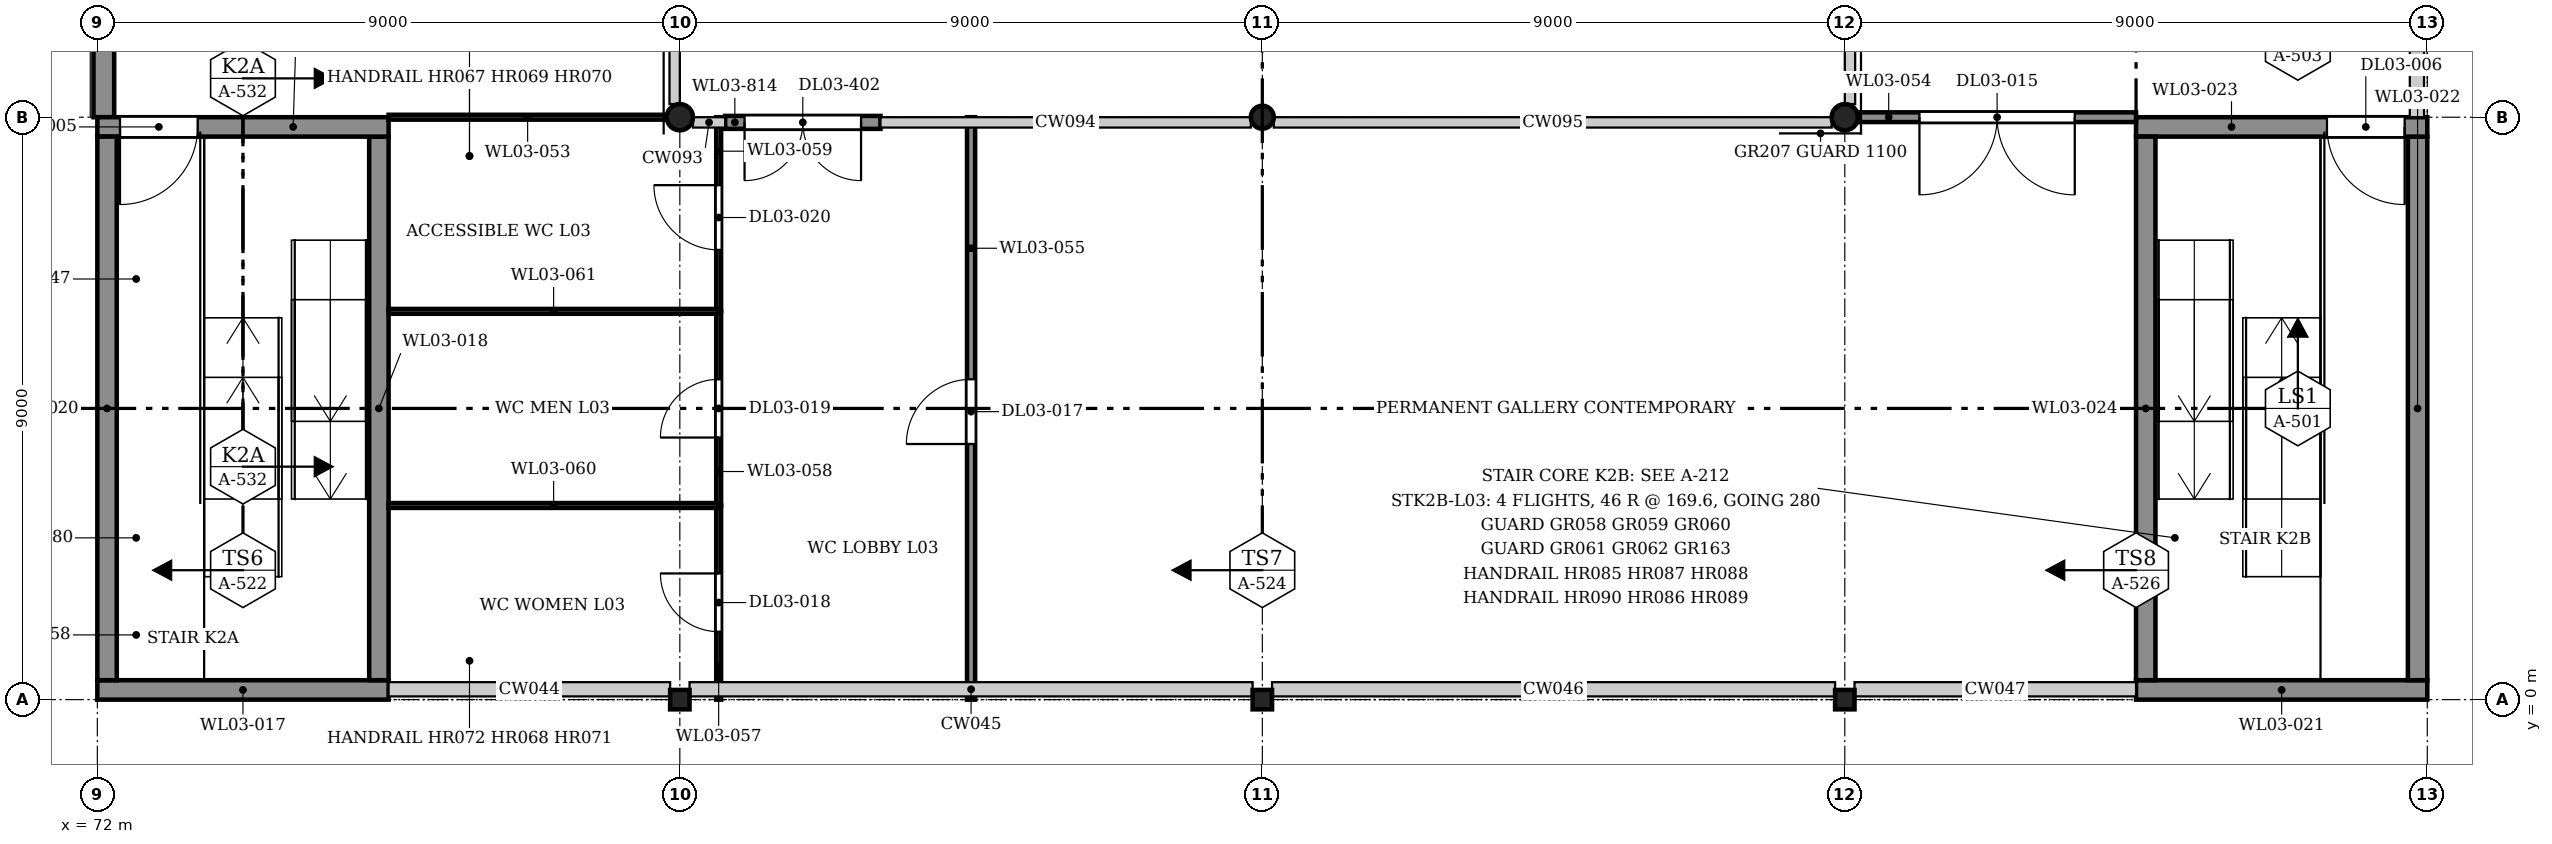
"""IFC4 building model, lengths in metres.
Left out: names, types, materials, properties, quantities, classifications, styles, units other than length and angle.
Written with IfcOpenShell. Run it as: python <this file> out.ifc"""

import sys

from ifc_helpers import new_model, si_unit, direction, frame, frame_2d, origin, origin_2d, place, context, subcontext, project, spatial, rectangle, hollow_rectangle, hollow_circle, extrude, element, fill, save


model = new_model("IFC4")
c1 = context("Model", 3, precision=1e-05, world=origin(), true_north=direction((0.0, 1.0)))
c2 = subcontext(c1, "Body", "Model", "MODEL_VIEW")
j1 = project(units=[si_unit("LENGTHUNIT", "METRE"), si_unit("PLANEANGLEUNIT", "RADIAN")], contexts=[c1])
p1 = place(None, origin())
s1 = spatial("IfcSite", under=j1, at=p1, CompositionType="ELEMENT")
p2 = place(p1, origin())
s2 = spatial("IfcBuilding", under=s1, at=p2, CompositionType="ELEMENT")
p3 = place(p2, frame((0.0, 0.0, 13.4)))
s3 = spatial("IfcBuildingStorey", under=s2, at=p3, CompositionType="ELEMENT", Elevation=13.4)
p4 = place(p3, frame((81.0, 0.0, 0.0), z_axis=(0.0, 0.0, 1.0), x_axis=(1.0, 0.0, 0.0)))
e1 = element("IfcColumn", 1, at=p4, inside=s3, PredefinedType="COLUMN", context=c2, shape_type="SweptSolid", body=[
    extrude(hollow_rectangle(XDim=0.3, YDim=0.3, WallThickness=0.016, InnerFilletRadius=0.024, OuterFilletRadius=0.04, at=origin_2d()), origin(), (0.0, 0.0, 1.0), 7.8),
])
p5 = place(p3, frame((90.0, 0.0, 0.0), z_axis=(0.0, 0.0, 1.0), x_axis=(1.0, 0.0, 0.0)))
e2 = element("IfcColumn", 2, at=p5, inside=s3, PredefinedType="COLUMN", context=c2, shape_type="SweptSolid", body=[
    extrude(hollow_rectangle(XDim=0.3, YDim=0.3, WallThickness=0.01, InnerFilletRadius=0.015, OuterFilletRadius=0.025, at=origin_2d()), origin(), (0.0, 0.0, 1.0), 7.8),
])
p6 = place(p3, frame((99.0, 0.0, 0.0), z_axis=(0.0, 0.0, 1.0), x_axis=(1.0, 0.0, 0.0)))
e3 = element("IfcColumn", 3, at=p6, inside=s3, PredefinedType="COLUMN", context=c2, shape_type="SweptSolid", body=[
    extrude(hollow_rectangle(XDim=0.3, YDim=0.3, WallThickness=0.016, InnerFilletRadius=0.024, OuterFilletRadius=0.04, at=origin_2d()), origin(), (0.0, 0.0, 1.0), 7.8),
])
p7 = place(p3, frame((81.0, 9.0, 0.0), z_axis=(0.0, 0.0, 1.0), x_axis=(1.0, 0.0, 0.0)))
e4 = element("IfcColumn", 4, at=p7, inside=s3, PredefinedType="COLUMN", context=c2, shape_type="SweptSolid", body=[
    extrude(hollow_circle(Radius=0.203, WallThickness=0.013, at=origin_2d()), origin(), (0.0, 0.0, 1.0), 7.8),
])
p8 = place(p3, frame((90.0, 9.0, 0.0), z_axis=(0.0, 0.0, 1.0), x_axis=(1.0, 0.0, 0.0)))
e5 = element("IfcColumn", 5, at=p8, inside=s3, PredefinedType="COLUMN", context=c2, shape_type="SweptSolid", body=[
    extrude(hollow_circle(Radius=0.178, WallThickness=0.013, at=origin_2d()), origin(), (0.0, 0.0, 1.0), 7.8),
])
p9 = place(p3, frame((99.0, 9.0, 0.0), z_axis=(0.0, 0.0, 1.0), x_axis=(1.0, 0.0, 0.0)))
e6 = element("IfcColumn", 6, at=p9, inside=s3, PredefinedType="COLUMN", context=c2, shape_type="SweptSolid", body=[
    extrude(hollow_circle(Radius=0.203, WallThickness=0.013, at=origin_2d()), origin(), (0.0, 0.0, 1.0), 7.8),
])
p10 = place(p3, frame((72.1, 9.0, 0.0), z_axis=(0.0, 0.0, 1.0), x_axis=(0.0, 1.0, 0.0)))
e7 = element("IfcWall", 7, at=p10, inside=s3, PredefinedType="SOLIDWALL", context=c2, shape_type="SweptSolid", body=[
    extrude(rectangle(XDim=9.0, YDim=0.32, at=frame_2d((4.5, 0.0))), origin(), (0.0, 0.0, 1.0), 7.635),
])
p11 = place(p3, frame((81.7, 8.92, 0.0), z_axis=(0.0, 0.0, 1.0), x_axis=(1.0, 0.0, 0.0)))
e8 = element("IfcWall", 8, at=p11, inside=s3, PredefinedType="SOLIDWALL", context=c2, shape_type="SweptSolid", body=[
    extrude(rectangle(XDim=2.4, YDim=0.2, at=frame_2d((1.2, 0.0))), origin(), (0.0, 0.0, 1.0), 6.732),
])
p12 = place(p11, frame((0.3, 0.0, 0.0)))
e9 = element("IfcOpeningElement", 9, at=p12, cuts=e8, PredefinedType="OPENING", context=c2, shape_type="SweptSolid", body=[
    extrude(rectangle(XDim=1.8, YDim=2.4, at=frame_2d((0.9, 1.2))), frame((0.0, 0.11, 0.0), z_axis=(0.0, -1.0, 0.0), x_axis=(1.0, 0.0, 0.0)), (0.0, 0.0, 1.0), 0.22),
])
p13 = place(p3, frame((72.0, 0.15, 0.0), z_axis=(0.0, 0.0, 1.0), x_axis=(1.0, 0.0, 0.0)))
e10 = element("IfcWall", 10, at=p13, inside=s3, PredefinedType="SOLIDWALL", context=c2, shape_type="SweptSolid", body=[
    extrude(rectangle(XDim=4.5, YDim=0.3, at=frame_2d((2.25, 0.0))), origin(), (0.0, 0.0, 1.0), 7.8),
])
p14 = place(p3, frame((76.35, 0.3, 0.0), z_axis=(0.0, 0.0, 1.0), x_axis=(0.0, 1.0, 0.0)))
e11 = element("IfcWall", 11, at=p14, inside=s3, PredefinedType="SOLIDWALL", context=c2, shape_type="SweptSolid", body=[
    extrude(rectangle(XDim=8.4, YDim=0.3, at=frame_2d((4.2, 0.0))), origin(), (0.0, 0.0, 1.0), 7.8),
])
p15 = place(p3, frame((72.0, 8.85, 0.0), z_axis=(0.0, 0.0, 1.0), x_axis=(1.0, 0.0, 0.0)))
e12 = element("IfcWall", 12, at=p15, inside=s3, PredefinedType="SOLIDWALL", context=c2, shape_type="SweptSolid", body=[
    extrude(rectangle(XDim=4.5, YDim=0.3, at=frame_2d((2.25, 0.0))), origin(), (0.0, 0.0, 1.0), 7.8),
])
p16 = place(p15, frame((0.35, 0.0, 0.0)))
e13 = element("IfcOpeningElement", 13, at=p16, cuts=e12, PredefinedType="OPENING", context=c2, shape_type="SweptSolid", body=[
    extrude(rectangle(XDim=1.2, YDim=2.1, at=frame_2d((0.6, 1.05))), frame((0.0, 0.16, 0.0), z_axis=(0.0, -1.0, 0.0), x_axis=(1.0, 0.0, 0.0)), (0.0, 0.0, 1.0), 0.32),
])
p17 = place(p3, frame((72.15, 0.3, 0.0), z_axis=(0.0, 0.0, 1.0), x_axis=(0.0, 1.0, 0.0)))
e14 = element("IfcWall", 14, at=p17, inside=s3, PredefinedType="SOLIDWALL", context=c2, shape_type="SweptSolid", body=[
    extrude(rectangle(XDim=8.4, YDim=0.3, at=frame_2d((4.2, 0.0))), origin(), (0.0, 0.0, 1.0), 7.8),
])
p18 = place(p3, frame((103.5, 0.15, 0.0), z_axis=(0.0, 0.0, 1.0), x_axis=(1.0, 0.0, 0.0)))
e15 = element("IfcWall", 15, at=p18, inside=s3, PredefinedType="SOLIDWALL", context=c2, shape_type="SweptSolid", body=[
    extrude(rectangle(XDim=4.5, YDim=0.3, at=frame_2d((2.25, 0.0))), origin(), (0.0, 0.0, 1.0), 7.8),
])
p19 = place(p3, frame((107.85, 0.3, 0.0), z_axis=(0.0, 0.0, 1.0), x_axis=(0.0, 1.0, 0.0)))
e16 = element("IfcWall", 16, at=p19, inside=s3, PredefinedType="SOLIDWALL", context=c2, shape_type="SweptSolid", body=[
    extrude(rectangle(XDim=8.4, YDim=0.3, at=frame_2d((4.2, 0.0))), origin(), (0.0, 0.0, 1.0), 7.8),
])
p20 = place(p3, frame((103.5, 8.85, 0.0), z_axis=(0.0, 0.0, 1.0), x_axis=(1.0, 0.0, 0.0)))
e17 = element("IfcWall", 17, at=p20, inside=s3, PredefinedType="SOLIDWALL", context=c2, shape_type="SweptSolid", body=[
    extrude(rectangle(XDim=4.5, YDim=0.3, at=frame_2d((2.25, 0.0))), origin(), (0.0, 0.0, 1.0), 7.8),
])
p21 = place(p20, frame((2.95, 0.0, 0.0)))
e18 = element("IfcOpeningElement", 18, at=p21, cuts=e17, PredefinedType="OPENING", context=c2, shape_type="SweptSolid", body=[
    extrude(rectangle(XDim=1.2, YDim=2.1, at=frame_2d((0.6, 1.05))), frame((0.0, 0.16, 0.0), z_axis=(0.0, -1.0, 0.0), x_axis=(1.0, 0.0, 0.0)), (0.0, 0.0, 1.0), 0.32),
])
p22 = place(p3, frame((103.65, 0.3, 0.0), z_axis=(0.0, 0.0, 1.0), x_axis=(0.0, 1.0, 0.0)))
e19 = element("IfcWall", 19, at=p22, inside=s3, PredefinedType="SOLIDWALL", context=c2, shape_type="SweptSolid", body=[
    extrude(rectangle(XDim=8.4, YDim=0.3, at=frame_2d((4.2, 0.0))), origin(), (0.0, 0.0, 1.0), 7.8),
])
p23 = place(p3, frame((76.5, 9.0, 0.0), z_axis=(0.0, 0.0, 1.0), x_axis=(1.0, 0.0, 0.0)))
e20 = element("IfcWall", 20, at=p23, inside=s3, PredefinedType="PARTITIONING", context=c2, shape_type="SweptSolid", body=[
    extrude(rectangle(XDim=4.297, YDim=0.075, at=frame_2d((2.148, 0.0))), origin(), (0.0, 0.0, 1.0), 7.175),
])
p24 = place(p3, frame((99.203, 9.0, 0.0), z_axis=(0.0, 0.0, 1.0), x_axis=(1.0, 0.0, 0.0)))
e21 = element("IfcWall", 21, at=p24, inside=s3, PredefinedType="PARTITIONING", context=c2, shape_type="SweptSolid", body=[
    extrude(rectangle(XDim=4.297, YDim=0.15, at=frame_2d((2.148, 0.0))), origin(), (0.0, 0.0, 1.0), 7.175),
])
p25 = place(p24, frame((0.95, 0.0, 0.0)))
e22 = element("IfcOpeningElement", 22, at=p25, cuts=e21, PredefinedType="OPENING", context=c2, shape_type="SweptSolid", body=[
    extrude(rectangle(XDim=2.4, YDim=2.4, at=frame_2d((1.2, 1.2))), frame((0.0, 0.085, 0.0), z_axis=(0.0, -1.0, 0.0), x_axis=(1.0, 0.0, 0.0)), (0.0, 0.0, 1.0), 0.17),
])
p26 = place(p3, frame((85.5, 0.0, 0.0), z_axis=(0.0, 0.0, 1.0), x_axis=(0.0, 1.0, 0.0)))
e23 = element("IfcWall", 23, at=p26, inside=s3, PredefinedType="PARTITIONING", context=c2, shape_type="SweptSolid", body=[
    extrude(rectangle(XDim=9.0, YDim=0.125, at=frame_2d((4.5, 0.0))), origin(), (0.0, 0.0, 1.0), 7.635),
])
p27 = place(p26, frame((3.95, 0.0, 0.0)))
e24 = element("IfcOpeningElement", 24, at=p27, cuts=e23, PredefinedType="OPENING", context=c2, shape_type="SweptSolid", body=[
    extrude(rectangle(XDim=1.0, YDim=2.1, at=frame_2d((0.5, 1.05))), frame((0.0, 0.073, 0.0), z_axis=(0.0, -1.0, 0.0), x_axis=(1.0, 0.0, 0.0)), (0.0, 0.0, 1.0), 0.145),
])
p28 = place(p3, frame((81.6, 0.0, 0.0), z_axis=(0.0, 0.0, 1.0), x_axis=(0.0, 1.0, 0.0)))
e25 = element("IfcWall", 25, at=p28, inside=s3, PredefinedType="PARTITIONING", context=c2, shape_type="SweptSolid", body=[
    extrude(rectangle(XDim=3.0, YDim=0.075, at=frame_2d((1.5, 0.0))), origin(), (0.0, 0.0, 1.0), 7.635),
])
p29 = place(p28, frame((1.05, 0.0, 0.0)))
e26 = element("IfcOpeningElement", 26, at=p29, cuts=e25, PredefinedType="OPENING", context=c2, shape_type="SweptSolid", body=[
    extrude(rectangle(XDim=0.9, YDim=2.1, at=frame_2d((0.45, 1.05))), frame((0.0, 0.047, 0.0), z_axis=(0.0, -1.0, 0.0), x_axis=(1.0, 0.0, 0.0)), (0.0, 0.0, 1.0), 0.095),
])
p30 = place(p3, frame((81.6, 3.0, 0.0), z_axis=(0.0, 0.0, 1.0), x_axis=(0.0, 1.0, 0.0)))
e27 = element("IfcWall", 27, at=p30, inside=s3, PredefinedType="PARTITIONING", context=c2, shape_type="SweptSolid", body=[
    extrude(rectangle(XDim=3.0, YDim=0.075, at=frame_2d((1.5, 0.0))), origin(), (0.0, 0.0, 1.0), 7.635),
])
p31 = place(p30, frame((1.05, 0.0, 0.0)))
e28 = element("IfcOpeningElement", 28, at=p31, cuts=e27, PredefinedType="OPENING", context=c2, shape_type="SweptSolid", body=[
    extrude(rectangle(XDim=0.9, YDim=2.1, at=frame_2d((0.45, 1.05))), frame((0.0, 0.047, 0.0), z_axis=(0.0, -1.0, 0.0), x_axis=(1.0, 0.0, 0.0)), (0.0, 0.0, 1.0), 0.095),
])
p32 = place(p3, frame((81.6, 6.0, 0.0), z_axis=(0.0, 0.0, 1.0), x_axis=(0.0, 1.0, 0.0)))
e29 = element("IfcWall", 29, at=p32, inside=s3, PredefinedType="PARTITIONING", context=c2, shape_type="SweptSolid", body=[
    extrude(rectangle(XDim=3.0, YDim=0.075, at=frame_2d((1.5, 0.0))), origin(), (0.0, 0.0, 1.0), 7.635),
])
p33 = place(p32, frame((0.95, 0.0, 0.0)))
e30 = element("IfcOpeningElement", 30, at=p33, cuts=e29, PredefinedType="OPENING", context=c2, shape_type="SweptSolid", body=[
    extrude(rectangle(XDim=1.0, YDim=2.1, at=frame_2d((0.5, 1.05))), frame((0.0, 0.047, 0.0), z_axis=(0.0, -1.0, 0.0), x_axis=(1.0, 0.0, 0.0)), (0.0, 0.0, 1.0), 0.095),
])
for number, where, z_axis, x_axis in (
    (31, (76.5, 3.0, 0.0), (0.0, 0.0, 1.0), (1.0, 0.0, 0.0)),
    (32, (76.5, 6.0, 0.0), (0.0, 0.0, 1.0), (1.0, 0.0, 0.0)),
):
    element("IfcWall", number, at=place(p3, frame(where, z_axis=z_axis, x_axis=x_axis)), inside=s3, PredefinedType="PARTITIONING", context=c2, shape_type="SweptSolid", body=[
        extrude(rectangle(XDim=5.1, YDim=0.075, at=frame_2d((2.55, 0.0))), origin(), (0.0, 0.0, 1.0), 7.635),
    ])
p34 = place(p12, frame((1.8, 0.0, 0.0), z_axis=(0.0, 0.0, 1.0), x_axis=(-1.0, 0.0, 0.0)))
e33 = element("IfcDoor", 33, at=p34, inside=s3, OperationType="DOUBLE_DOOR_SINGLE_SWING", PredefinedType="DOOR", context=c2, shape_type="SweptSolid", body=[
    extrude(rectangle(XDim=1.8, YDim=2.4, at=frame_2d((0.9, 1.2))), frame((0.0, 0.025, 0.0), z_axis=(0.0, -1.0, 0.0), x_axis=(1.0, 0.0, 0.0)), (0.0, 0.0, 1.0), 0.05),
])
fill(e9, e33)
p35 = place(p16, frame((1.2, 0.0, 0.0), z_axis=(0.0, 0.0, 1.0), x_axis=(-1.0, 0.0, 0.0)))
e34 = element("IfcDoor", 34, at=p35, inside=s3, OperationType="SINGLE_SWING_LEFT", PredefinedType="DOOR", context=c2, shape_type="SweptSolid", body=[
    extrude(rectangle(XDim=1.2, YDim=2.1, at=frame_2d((0.6, 1.05))), frame((0.0, 0.025, 0.0), z_axis=(0.0, -1.0, 0.0), x_axis=(1.0, 0.0, 0.0)), (0.0, 0.0, 1.0), 0.05),
])
fill(e13, e34)
p36 = place(p21, frame((1.2, 0.0, 0.0), z_axis=(0.0, 0.0, 1.0), x_axis=(-1.0, 0.0, 0.0)))
e35 = element("IfcDoor", 35, at=p36, inside=s3, OperationType="SINGLE_SWING_RIGHT", PredefinedType="DOOR", context=c2, shape_type="SweptSolid", body=[
    extrude(rectangle(XDim=1.2, YDim=2.1, at=frame_2d((0.6, 1.05))), frame((0.0, 0.025, 0.0), z_axis=(0.0, -1.0, 0.0), x_axis=(1.0, 0.0, 0.0)), (0.0, 0.0, 1.0), 0.05),
])
fill(e18, e35)
p37 = place(p25, frame((2.4, 0.0, 0.0), z_axis=(0.0, 0.0, 1.0), x_axis=(-1.0, 0.0, 0.0)))
e36 = element("IfcDoor", 36, at=p37, inside=s3, OperationType="DOUBLE_DOOR_SINGLE_SWING", PredefinedType="DOOR", context=c2, shape_type="SweptSolid", body=[
    extrude(rectangle(XDim=2.4, YDim=2.4, at=frame_2d((1.2, 1.2))), frame((0.0, 0.025, 0.0), z_axis=(0.0, -1.0, 0.0), x_axis=(1.0, 0.0, 0.0)), (0.0, 0.0, 1.0), 0.05),
])
fill(e22, e36)
p38 = place(p27, origin())
e37 = element("IfcDoor", 37, at=p38, inside=s3, OperationType="SINGLE_SWING_RIGHT", PredefinedType="DOOR", context=c2, shape_type="SweptSolid", body=[
    extrude(rectangle(XDim=1.0, YDim=2.1, at=frame_2d((0.5, 1.05))), frame((0.0, 0.025, 0.0), z_axis=(0.0, -1.0, 0.0), x_axis=(1.0, 0.0, 0.0)), (0.0, 0.0, 1.0), 0.05),
])
fill(e24, e37)
p39 = place(p29, origin())
e38 = element("IfcDoor", 38, at=p39, inside=s3, OperationType="SINGLE_SWING_LEFT", PredefinedType="DOOR", context=c2, shape_type="SweptSolid", body=[
    extrude(rectangle(XDim=0.9, YDim=2.1, at=frame_2d((0.45, 1.05))), frame((0.0, 0.025, 0.0), z_axis=(0.0, -1.0, 0.0), x_axis=(1.0, 0.0, 0.0)), (0.0, 0.0, 1.0), 0.05),
])
fill(e26, e38)
p40 = place(p31, origin())
e39 = element("IfcDoor", 39, at=p40, inside=s3, OperationType="SINGLE_SWING_RIGHT", PredefinedType="DOOR", context=c2, shape_type="SweptSolid", body=[
    extrude(rectangle(XDim=0.9, YDim=2.1, at=frame_2d((0.45, 1.05))), frame((0.0, 0.025, 0.0), z_axis=(0.0, -1.0, 0.0), x_axis=(1.0, 0.0, 0.0)), (0.0, 0.0, 1.0), 0.05),
])
fill(e28, e39)
p41 = place(p33, origin())
e40 = element("IfcDoor", 40, at=p41, inside=s3, OperationType="SINGLE_SWING_LEFT", PredefinedType="DOOR", context=c2, shape_type="SweptSolid", body=[
    extrude(rectangle(XDim=1.0, YDim=2.1, at=frame_2d((0.5, 1.05))), frame((0.0, 0.025, 0.0), z_axis=(0.0, -1.0, 0.0), x_axis=(1.0, 0.0, 0.0)), (0.0, 0.0, 1.0), 0.05),
])
fill(e30, e40)
save(model, sys.argv[1])
